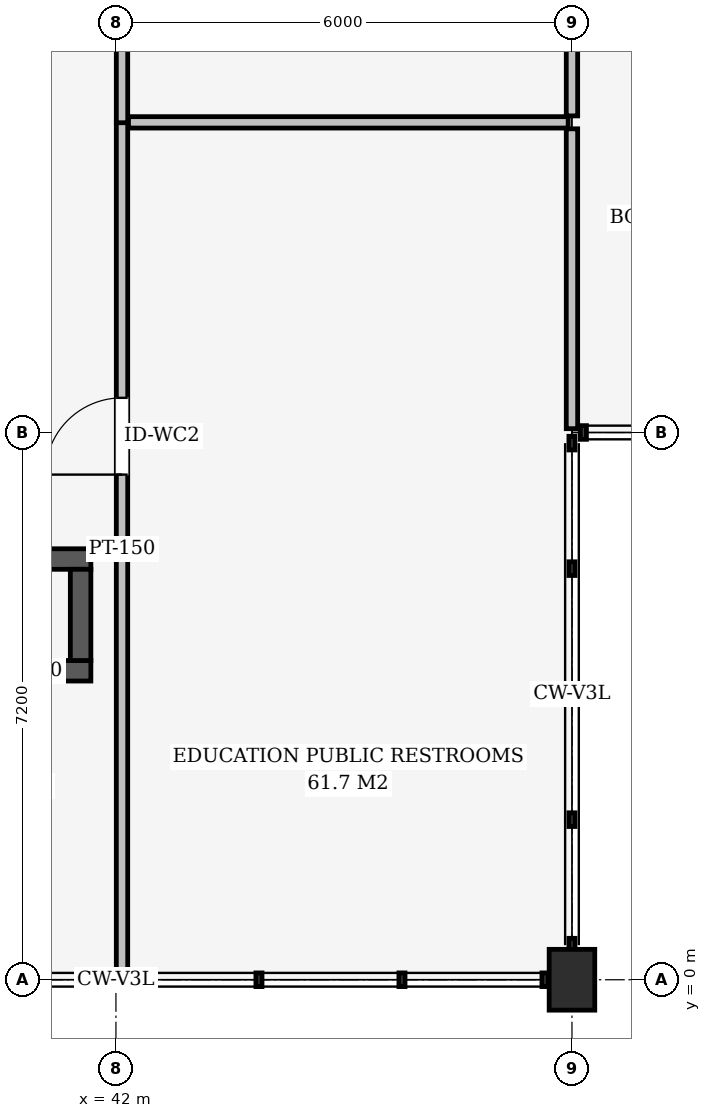
"""IFC4 building model, lengths in metres.
Left out: names, types, materials, properties, quantities, classifications, styles, units other than length and angle.
Written with IfcOpenShell. Run it as: python <this file> out.ifc"""

import sys

from ifc_helpers import new_model, si_unit, direction, frame, frame_2d, origin, origin_2d, place, context, subcontext, project, spatial, rectangle, extrude, element, fill, save


model = new_model("IFC4")
c1 = context("Model", 3, precision=1e-05, world=origin(), true_north=direction((0.0, 1.0)))
c2 = subcontext(c1, "Body", "Model", "MODEL_VIEW")
j1 = project(units=[si_unit("LENGTHUNIT", "METRE"), si_unit("PLANEANGLEUNIT", "RADIAN")], contexts=[c1])
p1 = place(None, origin())
s1 = spatial("IfcSite", under=j1, at=p1, CompositionType="ELEMENT")
p2 = place(p1, origin())
s2 = spatial("IfcBuilding", under=s1, at=p2, CompositionType="ELEMENT")
p3 = place(p2, origin())
s3 = spatial("IfcBuildingStorey", under=s2, at=p3, CompositionType="ELEMENT", Elevation=0.0)
p4 = place(p3, frame((48.0, 0.0, 0.0), z_axis=(0.0, 0.0, 1.0), x_axis=(1.0, 0.0, 0.0)))
e1 = element("IfcColumn", 1, at=p4, inside=s3, PredefinedType="COLUMN", context=c2, shape_type="SweptSolid", body=[
    extrude(rectangle(XDim=0.6, YDim=0.8, at=origin_2d()), origin(), (0.0, 0.0, 1.0), 4.8),
])
for number, where, z_axis, x_axis in (
    (2, (39.93, 4.065, 0.0), (0.0, 0.0, 1.0), (1.0, 0.0, 0.0)),
    (3, (39.93, 5.535, 0.0), (0.0, 0.0, 1.0), (1.0, 0.0, 0.0)),
):
    element("IfcWall", number, at=place(p3, frame(where, z_axis=z_axis, x_axis=x_axis)), inside=s3, PredefinedType="SHEAR", context=c2, shape_type="SweptSolid", body=[
        extrude(rectangle(XDim=1.74, YDim=0.27, at=frame_2d((0.87, 0.0))), origin(), (0.0, 0.0, 1.0), 4.55),
    ])
p5 = place(p3, frame((41.535, 4.2, 0.0), z_axis=(0.0, 0.0, 1.0), x_axis=(0.0, 1.0, 0.0)))
e4 = element("IfcWall", 4, at=p5, inside=s3, PredefinedType="SHEAR", context=c2, shape_type="SweptSolid", body=[
    extrude(rectangle(XDim=1.2, YDim=0.27, at=frame_2d((0.6, 0.0))), origin(), (0.0, 0.0, 1.0), 4.55),
])
p6 = place(p3, frame((42.08, 0.05, 0.0), z_axis=(0.0, 0.0, 1.0), x_axis=(0.0, 1.0, 0.0)))
e5 = element("IfcWall", 5, at=p6, inside=s3, PredefinedType="PARTITIONING", context=c2, shape_type="SweptSolid", body=[
    extrude(rectangle(XDim=11.235, YDim=0.15, at=frame_2d((5.617, 0.0))), origin(), (0.0, 0.0, 1.0), 3.986),
])
p7 = place(p6, frame((6.596, 0.0, 0.0)))
e6 = element("IfcOpeningElement", 6, at=p7, cuts=e5, PredefinedType="OPENING", context=c2, shape_type="SweptSolid", body=[
    extrude(rectangle(XDim=1.01, YDim=2.1, at=frame_2d((0.505, 1.05))), frame((0.0, 0.085, 0.0), z_axis=(0.0, -1.0, 0.0), x_axis=(1.0, 0.0, 0.0)), (0.0, 0.0, 1.0), 0.17),
])
p8 = place(p3, frame((42.08, 11.275, 0.0), z_axis=(0.0, 0.0, 1.0), x_axis=(0.0, 1.0, 0.0)))
e7 = element("IfcWall", 7, at=p8, inside=s3, PredefinedType="PARTITIONING", context=c2, shape_type="SweptSolid", body=[
    extrude(rectangle(XDim=4.275, YDim=0.15, at=frame_2d((2.138, 0.0))), origin(), (0.0, 0.0, 1.0), 3.986),
])
p9 = place(p8, frame((1.667, 0.0, 0.0)))
e8 = element("IfcOpeningElement", 8, at=p9, cuts=e7, PredefinedType="OPENING", context=c2, shape_type="SweptSolid", body=[
    extrude(rectangle(XDim=0.94, YDim=2.1, at=frame_2d((0.47, 1.05))), frame((0.0, 0.085, 0.0), z_axis=(0.0, -1.0, 0.0), x_axis=(1.0, 0.0, 0.0)), (0.0, 0.0, 1.0), 0.17),
])
p10 = place(p3, frame((42.165, 11.28, 0.0), z_axis=(0.0, 0.0, 1.0), x_axis=(1.0, 0.0, 0.0)))
e9 = element("IfcWall", 9, at=p10, inside=s3, PredefinedType="PARTITIONING", context=c2, shape_type="SweptSolid", body=[
    extrude(rectangle(XDim=5.785, YDim=0.15, at=frame_2d((2.893, 0.0))), origin(), (0.0, 0.0, 1.0), 4.53),
])
p11 = place(p3, frame((48.0, 7.25, 0.0), z_axis=(0.0, 0.0, 1.0), x_axis=(0.0, 1.0, 0.0)))
e10 = element("IfcWall", 10, at=p11, inside=s3, PredefinedType="PARTITIONING", context=c2, shape_type="SweptSolid", body=[
    extrude(rectangle(XDim=3.945, YDim=0.15, at=frame_2d((1.973, 0.0))), origin(), (0.0, 0.0, 1.0), 3.684),
])
p12 = place(p3, frame((48.0, 11.365, 0.0), z_axis=(0.0, 0.0, 1.0), x_axis=(0.0, 1.0, 0.0)))
e11 = element("IfcWall", 11, at=p12, inside=s3, PredefinedType="PARTITIONING", context=c2, shape_type="SweptSolid", body=[
    extrude(rectangle(XDim=2.76, YDim=0.15, at=frame_2d((1.38, 0.0))), origin(), (0.0, 0.0, 1.0), 3.684),
])
p13 = place(p7, origin())
e12 = element("IfcDoor", 12, at=p13, inside=s3, OperationType="SINGLE_SWING_LEFT", PredefinedType="DOOR", context=c2, shape_type="SweptSolid", body=[
    extrude(rectangle(XDim=1.01, YDim=2.1, at=frame_2d((0.505, 1.05))), frame((0.0, 0.025, 0.0), z_axis=(0.0, -1.0, 0.0), x_axis=(1.0, 0.0, 0.0)), (0.0, 0.0, 1.0), 0.05),
])
fill(e6, e12)
save(model, sys.argv[1])
